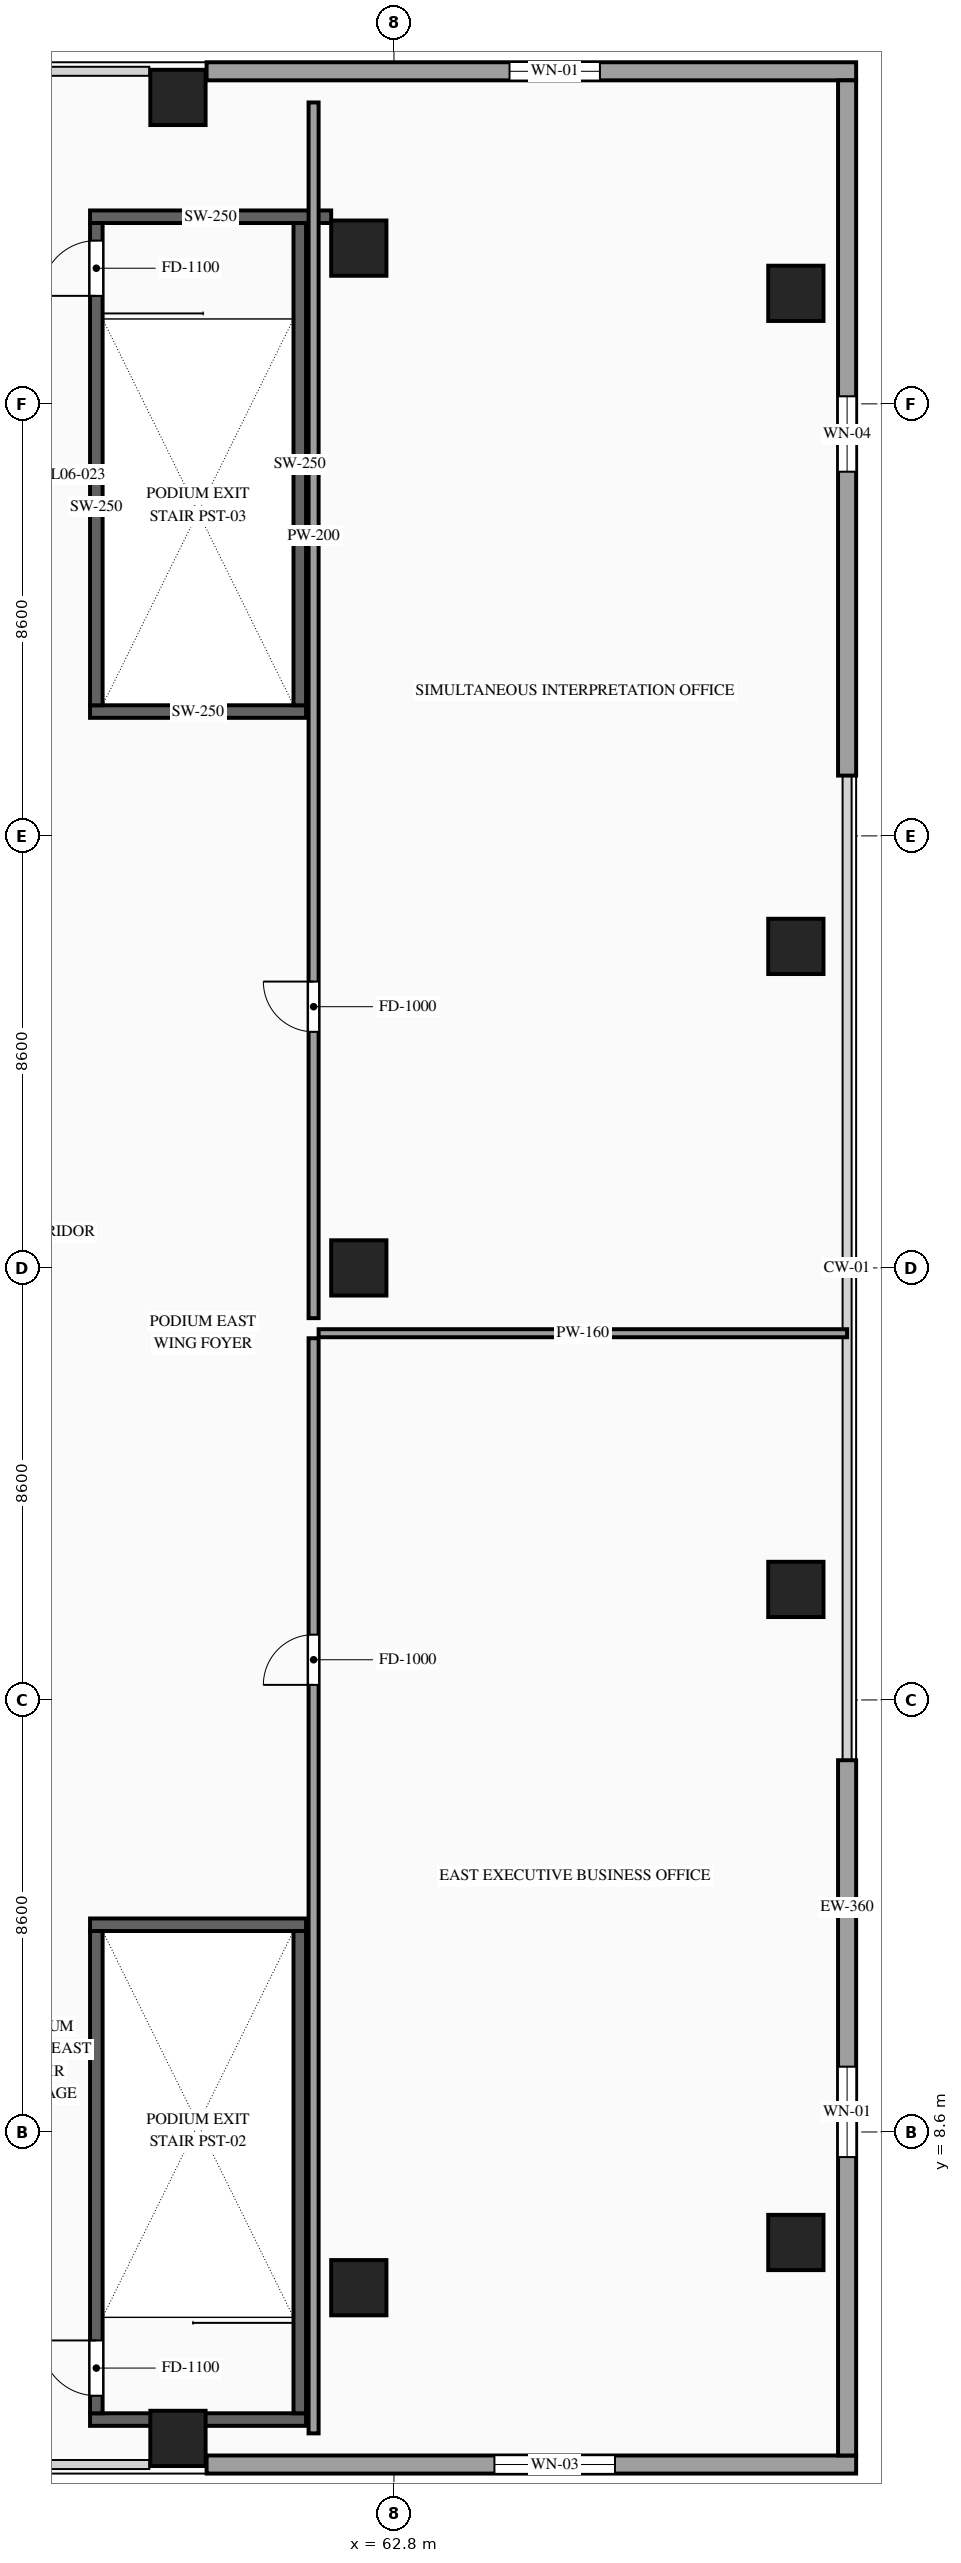
"""IFC4 building model, lengths in metres.
Left out: names, types, materials, properties, quantities, classifications, styles, units other than length and angle.
Written with IfcOpenShell. Run it as: python <this file> out.ifc"""

import sys

from ifc_helpers import new_model, si_unit, direction, frame, frame_2d, origin, origin_2d, place, context, subcontext, project, spatial, rectangle, extrude, source, transform, mapped, element, fill, save


model = new_model("IFC4")
c1 = context("Model", 3, precision=1e-05, world=origin(), true_north=direction((0.0, 1.0)))
c2 = subcontext(c1, "Body", "Model", "MODEL_VIEW")
j1 = project(units=[si_unit("LENGTHUNIT", "METRE"), si_unit("PLANEANGLEUNIT", "RADIAN")], contexts=[c1])
p1 = place(None, origin())
s1 = spatial("IfcSite", under=j1, at=p1, CompositionType="ELEMENT")
p2 = place(p1, origin())
s2 = spatial("IfcBuilding", under=s1, at=p2, CompositionType="ELEMENT")
p3 = place(p2, frame((0.0, 0.0, 25.8)))
s3 = spatial("IfcBuildingStorey", under=s2, at=p3, CompositionType="ELEMENT", Elevation=25.8)
m1 = source(origin(), c2, "Body", "SweptSolid", [
    extrude(rectangle(XDim=1.1, YDim=1.1, at=origin_2d()), origin(), (0.0, 0.0, 1.0), 4.8),
])
for number, where, z_axis, x_axis in (
    (1, (70.8, 6.4, 0.0), (0.0, 0.0, 1.0), (1.0, 0.0, 0.0)),
    (2, (70.8, 19.4, 0.0), (0.0, 0.0, 1.0), (1.0, 0.0, 0.0)),
    (3, (70.8, 32.2, 0.0), (0.0, 0.0, 1.0), (1.0, 0.0, 0.0)),
    (4, (70.8, 45.2, 0.0), (0.0, 0.0, 1.0), (1.0, 0.0, 0.0)),
    (5, (62.1, 5.5, 0.0), (0.0, 0.0, 1.0), (1.0, 0.0, 0.0)),
    (6, (62.1, 25.8, 0.0), (0.0, 0.0, 1.0), (1.0, 0.0, 0.0)),
    (7, (62.1, 46.1, 0.0), (0.0, 0.0, 1.0), (1.0, 0.0, 0.0)),
    (8, (58.5, 2.5, 0.0), (0.0, 0.0, 1.0), (1.0, 0.0, 0.0)),
    (9, (58.5, 49.1, 0.0), (0.0, 0.0, 1.0), (1.0, 0.0, 0.0)),
):
    element("IfcColumn", number, at=place(p3, frame(where, z_axis=z_axis, x_axis=x_axis)), inside=s3, PredefinedType="COLUMN", context=c2, shape_type="MappedRepresentation", body=[
        mapped(m1, transform((0.0, 0.0, 0.0), scale=1.0)),
    ])
p4 = place(p3, frame((59.07, 1.98, 0.0), z_axis=(0.0, 0.0, 1.0), x_axis=(1.0, 0.0, 0.0)))
e10 = element("IfcWall", 10, at=p4, inside=s3, PredefinedType="SOLIDWALL", context=c2, shape_type="SweptSolid", body=[
    extrude(rectangle(XDim=12.93, YDim=0.36, at=frame_2d((6.465, 0.0))), origin(), (0.0, 0.0, 1.0), 4.5),
])
p5 = place(p4, frame((5.73, 0.0, 0.85)))
e11 = element("IfcOpeningElement", 11, at=p5, cuts=e10, PredefinedType="OPENING", context=c2, shape_type="SweptSolid", body=[
    extrude(rectangle(XDim=2.4, YDim=2.4, at=frame_2d((1.2, 1.2))), frame((0.0, 0.195, 0.0), z_axis=(0.0, -1.0, 0.0), x_axis=(1.0, 0.0, 0.0)), (0.0, 0.0, 1.0), 0.39),
])
p6 = place(p3, frame((59.07, 49.62, 0.0), z_axis=(0.0, 0.0, 1.0), x_axis=(1.0, 0.0, 0.0)))
e12 = element("IfcWall", 12, at=p6, inside=s3, PredefinedType="SOLIDWALL", context=c2, shape_type="SweptSolid", body=[
    extrude(rectangle(XDim=12.93, YDim=0.36, at=frame_2d((6.465, 0.0))), origin(), (0.0, 0.0, 1.0), 4.5),
])
p7 = place(p6, frame((6.03, 0.0, 0.9)))
e13 = element("IfcOpeningElement", 13, at=p7, cuts=e12, PredefinedType="OPENING", context=c2, shape_type="SweptSolid", body=[
    extrude(rectangle(XDim=1.8, YDim=2.2, at=frame_2d((0.9, 1.1))), frame((0.0, 0.195, 0.0), z_axis=(0.0, -1.0, 0.0), x_axis=(1.0, 0.0, 0.0)), (0.0, 0.0, 1.0), 0.39),
])
p8 = place(p3, frame((71.82, 2.16, 0.0), z_axis=(0.0, 0.0, 1.0), x_axis=(0.0, 1.0, 0.0)))
e14 = element("IfcWall", 14, at=p8, inside=s3, PredefinedType="SOLIDWALL", context=c2, shape_type="SweptSolid", body=[
    extrude(rectangle(XDim=13.84, YDim=0.36, at=frame_2d((6.92, 0.0))), origin(), (0.0, 0.0, 1.0), 4.5),
])
p9 = place(p8, frame((5.94, 0.0, 0.9)))
e15 = element("IfcOpeningElement", 15, at=p9, cuts=e14, PredefinedType="OPENING", context=c2, shape_type="SweptSolid", body=[
    extrude(rectangle(XDim=1.8, YDim=2.2, at=frame_2d((0.9, 1.1))), frame((0.0, 0.195, 0.0), z_axis=(0.0, -1.0, 0.0), x_axis=(1.0, 0.0, 0.0)), (0.0, 0.0, 1.0), 0.39),
])
p10 = place(p3, frame((71.82, 35.6, 0.0), z_axis=(0.0, 0.0, 1.0), x_axis=(0.0, 1.0, 0.0)))
e16 = element("IfcWall", 16, at=p10, inside=s3, PredefinedType="SOLIDWALL", context=c2, shape_type="SweptSolid", body=[
    extrude(rectangle(XDim=13.84, YDim=0.36, at=frame_2d((6.92, 0.0))), origin(), (0.0, 0.0, 1.0), 4.5),
])
p11 = place(p10, frame((6.05, 0.0, 0.9)))
e17 = element("IfcOpeningElement", 17, at=p11, cuts=e16, PredefinedType="OPENING", context=c2, shape_type="SweptSolid", body=[
    extrude(rectangle(XDim=1.5, YDim=1.8, at=frame_2d((0.75, 0.9))), frame((0.0, 0.195, 0.0), z_axis=(0.0, -1.0, 0.0), x_axis=(1.0, 0.0, 0.0)), (0.0, 0.0, 1.0), 0.39),
])
m2 = source(origin(), c2, "Body", "SweptSolid", [
    extrude(rectangle(XDim=4.3, YDim=0.25, at=frame_2d((2.15, 0.0))), origin(), (0.0, 0.0, 1.0), 4.5),
])
for number, where, z_axis, x_axis in (
    (18, (56.75, 2.875, 0.0), (0.0, 0.0, 1.0), (1.0, 0.0, 0.0)),
    (19, (56.75, 12.725, 0.0), (0.0, 0.0, 1.0), (1.0, 0.0, 0.0)),
):
    element("IfcWall", number, at=place(p3, frame(where, z_axis=z_axis, x_axis=x_axis)), inside=s3, PredefinedType="SOLIDWALL", context=c2, shape_type="MappedRepresentation", body=[
        mapped(m2, transform((0.0, 0.0, 0.0), scale=1.0)),
    ])
p12 = place(p3, frame((56.875, 3.0, 0.0), z_axis=(0.0, 0.0, 1.0), x_axis=(0.0, 1.0, 0.0)))
e20 = element("IfcWall", 20, at=p12, inside=s3, PredefinedType="SOLIDWALL", context=c2, shape_type="SweptSolid", body=[
    extrude(rectangle(XDim=9.6, YDim=0.25, at=frame_2d((4.8, 0.0))), origin(), (0.0, 0.0, 1.0), 4.5),
])
p13 = place(p12, frame((0.35, 0.0, 0.0)))
e21 = element("IfcOpeningElement", 21, at=p13, cuts=e20, PredefinedType="OPENING", context=c2, shape_type="SweptSolid", body=[
    extrude(rectangle(XDim=1.1, YDim=2.2, at=frame_2d((0.55, 1.1))), frame((0.0, 0.14, 0.0), z_axis=(0.0, -1.0, 0.0), x_axis=(1.0, 0.0, 0.0)), (0.0, 0.0, 1.0), 0.28),
])
m3 = source(origin(), c2, "Body", "SweptSolid", [
    extrude(rectangle(XDim=9.6, YDim=0.25, at=frame_2d((4.8, 0.0))), origin(), (0.0, 0.0, 1.0), 4.5),
])
p14 = place(p3, frame((60.925, 3.0, 0.0), z_axis=(0.0, 0.0, 1.0), x_axis=(0.0, 1.0, 0.0)))
e22 = element("IfcWall", 22, at=p14, inside=s3, PredefinedType="SOLIDWALL", context=c2, shape_type="MappedRepresentation", body=[
    mapped(m3, transform((0.0, 0.0, 0.0), scale=1.0)),
])
p15 = place(p3, frame((56.75, 36.875, 0.0), z_axis=(0.0, 0.0, 1.0), x_axis=(1.0, 0.0, 0.0)))
e23 = element("IfcWall", 23, at=p15, inside=s3, PredefinedType="SOLIDWALL", context=c2, shape_type="MappedRepresentation", body=[
    mapped(m2, transform((0.0, 0.0, 0.0), scale=1.0)),
])
m4 = source(origin(), c2, "Body", "SweptSolid", [
    extrude(rectangle(XDim=4.8, YDim=0.25, at=frame_2d((2.4, 0.0))), origin(), (0.0, 0.0, 1.0), 4.5),
])
p16 = place(p3, frame((56.75, 46.725, 0.0), z_axis=(0.0, 0.0, 1.0), x_axis=(1.0, 0.0, 0.0)))
e24 = element("IfcWall", 24, at=p16, inside=s3, PredefinedType="SOLIDWALL", context=c2, shape_type="MappedRepresentation", body=[
    mapped(m4, transform((0.0, 0.0, 0.0), scale=1.0)),
])
p17 = place(p3, frame((56.875, 37.0, 0.0), z_axis=(0.0, 0.0, 1.0), x_axis=(0.0, 1.0, 0.0)))
e25 = element("IfcWall", 25, at=p17, inside=s3, PredefinedType="SOLIDWALL", context=c2, shape_type="SweptSolid", body=[
    extrude(rectangle(XDim=9.6, YDim=0.25, at=frame_2d((4.8, 0.0))), origin(), (0.0, 0.0, 1.0), 4.5),
])
p18 = place(p17, frame((8.15, 0.0, 0.0)))
e26 = element("IfcOpeningElement", 26, at=p18, cuts=e25, PredefinedType="OPENING", context=c2, shape_type="SweptSolid", body=[
    extrude(rectangle(XDim=1.1, YDim=2.2, at=frame_2d((0.55, 1.1))), frame((0.0, 0.14, 0.0), z_axis=(0.0, -1.0, 0.0), x_axis=(1.0, 0.0, 0.0)), (0.0, 0.0, 1.0), 0.28),
])
p19 = place(p3, frame((60.925, 37.0, 0.0), z_axis=(0.0, 0.0, 1.0), x_axis=(0.0, 1.0, 0.0)))
e27 = element("IfcWall", 27, at=p19, inside=s3, PredefinedType="SOLIDWALL", context=c2, shape_type="MappedRepresentation", body=[
    mapped(m3, transform((0.0, 0.0, 0.0), scale=1.0)),
])
p20 = place(p3, frame((61.2, 2.6, 0.0), z_axis=(0.0, 0.0, 1.0), x_axis=(0.0, 1.0, 0.0)))
e28 = element("IfcWall", 28, at=p20, inside=s3, PredefinedType="PARTITIONING", context=c2, shape_type="SweptSolid", body=[
    extrude(rectangle(XDim=21.8, YDim=0.2, at=frame_2d((10.9, 0.0))), origin(), (0.0, 0.0, 1.0), 4.5),
])
p21 = place(p20, frame((14.9, 0.0, 0.0)))
e29 = element("IfcOpeningElement", 29, at=p21, cuts=e28, PredefinedType="OPENING", context=c2, shape_type="SweptSolid", body=[
    extrude(rectangle(XDim=1.0, YDim=2.2, at=frame_2d((0.5, 1.1))), frame((0.0, 0.115, 0.0), z_axis=(0.0, -1.0, 0.0), x_axis=(1.0, 0.0, 0.0)), (0.0, 0.0, 1.0), 0.23),
])
m5 = source(origin(), c2, "Body", "SweptSolid", [
    extrude(rectangle(XDim=10.52, YDim=0.16, at=frame_2d((5.26, 0.0))), origin(), (0.0, 0.0, 1.0), 4.5),
])
p22 = place(p3, frame((61.3, 24.5, 0.0), z_axis=(0.0, 0.0, 1.0), x_axis=(1.0, 0.0, 0.0)))
e30 = element("IfcWall", 30, at=p22, inside=s3, PredefinedType="PARTITIONING", context=c2, shape_type="MappedRepresentation", body=[
    mapped(m5, transform((0.0, 0.0, 0.0), scale=1.0)),
])
p23 = place(p3, frame((61.2, 24.8, 0.0), z_axis=(0.0, 0.0, 1.0), x_axis=(0.0, 1.0, 0.0)))
e31 = element("IfcWall", 31, at=p23, inside=s3, PredefinedType="PARTITIONING", context=c2, shape_type="SweptSolid", body=[
    extrude(rectangle(XDim=24.2, YDim=0.2, at=frame_2d((12.1, 0.0))), origin(), (0.0, 0.0, 1.0), 4.5),
])
p24 = place(p23, frame((5.7, 0.0, 0.0)))
e32 = element("IfcOpeningElement", 32, at=p24, cuts=e31, PredefinedType="OPENING", context=c2, shape_type="SweptSolid", body=[
    extrude(rectangle(XDim=1.0, YDim=2.2, at=frame_2d((0.5, 1.1))), frame((0.0, 0.115, 0.0), z_axis=(0.0, -1.0, 0.0), x_axis=(1.0, 0.0, 0.0)), (0.0, 0.0, 1.0), 0.23),
])
m6 = source(origin(), c2, "Body", "SweptSolid", [
    extrude(rectangle(XDim=2.4, YDim=2.4, at=frame_2d((1.2, 1.2))), frame((0.0, 0.03, 0.0), z_axis=(0.0, -1.0, 0.0), x_axis=(1.0, 0.0, 0.0)), (0.0, 0.0, 1.0), 0.06),
])
p25 = place(p5, origin())
e33 = element("IfcWindow", 33, at=p25, inside=s3, PartitioningType="SINGLE_PANEL", PredefinedType="WINDOW", context=c2, shape_type="MappedRepresentation", body=[
    mapped(m6, transform((0.0, 0.0, 0.0), scale=1.0)),
])
fill(e11, e33)
m7 = source(origin(), c2, "Body", "SweptSolid", [
    extrude(rectangle(XDim=1.8, YDim=2.2, at=frame_2d((0.9, 1.1))), frame((0.0, 0.03, 0.0), z_axis=(0.0, -1.0, 0.0), x_axis=(1.0, 0.0, 0.0)), (0.0, 0.0, 1.0), 0.06),
])
p26 = place(p7, origin())
e34 = element("IfcWindow", 34, at=p26, inside=s3, PartitioningType="SINGLE_PANEL", PredefinedType="WINDOW", context=c2, shape_type="MappedRepresentation", body=[
    mapped(m7, transform((0.0, 0.0, 0.0), scale=1.0)),
])
fill(e13, e34)
p27 = place(p9, origin())
e35 = element("IfcWindow", 35, at=p27, inside=s3, PartitioningType="SINGLE_PANEL", PredefinedType="WINDOW", context=c2, shape_type="MappedRepresentation", body=[
    mapped(m7, transform((0.0, 0.0, 0.0), scale=1.0)),
])
fill(e15, e35)
m8 = source(origin(), c2, "Body", "SweptSolid", [
    extrude(rectangle(XDim=1.5, YDim=1.8, at=frame_2d((0.75, 0.9))), frame((0.0, 0.03, 0.0), z_axis=(0.0, -1.0, 0.0), x_axis=(1.0, 0.0, 0.0)), (0.0, 0.0, 1.0), 0.06),
])
p28 = place(p11, origin())
e36 = element("IfcWindow", 36, at=p28, inside=s3, PartitioningType="SINGLE_PANEL", PredefinedType="WINDOW", context=c2, shape_type="MappedRepresentation", body=[
    mapped(m8, transform((0.0, 0.0, 0.0), scale=1.0)),
])
fill(e17, e36)
m9 = source(origin(), c2, "Body", "SweptSolid", [
    extrude(rectangle(XDim=1.1, YDim=2.2, at=frame_2d((0.55, 1.1))), frame((0.0, 0.025, 0.0), z_axis=(0.0, -1.0, 0.0), x_axis=(1.0, 0.0, 0.0)), (0.0, 0.0, 1.0), 0.05),
])
p29 = place(p13, origin())
e37 = element("IfcDoor", 37, at=p29, inside=s3, OperationType="SINGLE_SWING_RIGHT", PredefinedType="DOOR", context=c2, shape_type="MappedRepresentation", body=[
    mapped(m9, transform((0.0, 0.0, 0.0), scale=1.0)),
])
fill(e21, e37)
p30 = place(p18, origin())
e38 = element("IfcDoor", 38, at=p30, inside=s3, OperationType="SINGLE_SWING_LEFT", PredefinedType="DOOR", context=c2, shape_type="MappedRepresentation", body=[
    mapped(m9, transform((0.0, 0.0, 0.0), scale=1.0)),
])
fill(e26, e38)
m10 = source(origin(), c2, "Body", "SweptSolid", [
    extrude(rectangle(XDim=1.0, YDim=2.2, at=frame_2d((0.5, 1.1))), frame((0.0, 0.025, 0.0), z_axis=(0.0, -1.0, 0.0), x_axis=(1.0, 0.0, 0.0)), (0.0, 0.0, 1.0), 0.05),
])
p31 = place(p21, origin())
e39 = element("IfcDoor", 39, at=p31, inside=s3, OperationType="SINGLE_SWING_LEFT", PredefinedType="DOOR", context=c2, shape_type="MappedRepresentation", body=[
    mapped(m10, transform((0.0, 0.0, 0.0), scale=1.0)),
])
fill(e29, e39)
p32 = place(p24, origin())
e40 = element("IfcDoor", 40, at=p32, inside=s3, OperationType="SINGLE_SWING_RIGHT", PredefinedType="DOOR", context=c2, shape_type="MappedRepresentation", body=[
    mapped(m10, transform((0.0, 0.0, 0.0), scale=1.0)),
])
fill(e32, e40)
save(model, sys.argv[1])
